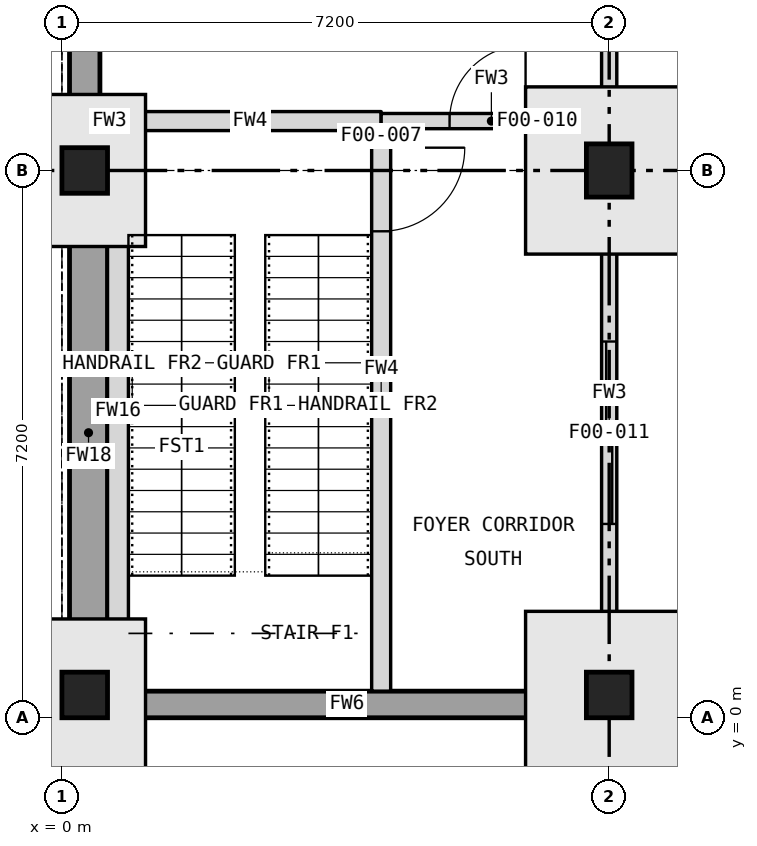
"""IFC4 building model, lengths in metres.
Left out: names, types, materials, properties, quantities, classifications, styles, units other than length and angle.
Written with IfcOpenShell. Run it as: python <this file> out.ifc"""

import sys

from ifc_helpers import new_model, si_unit, direction, frame, frame_2d, origin, origin_2d, place, context, subcontext, project, spatial, rectangle, extrude, element, fill, save


model = new_model("IFC4")
c1 = context("Model", 3, precision=1e-05, world=origin(), true_north=direction((0.0, 1.0)))
c2 = subcontext(c1, "Body", "Model", "MODEL_VIEW")
j1 = project(units=[si_unit("LENGTHUNIT", "METRE"), si_unit("PLANEANGLEUNIT", "RADIAN")], contexts=[c1])
p1 = place(None, origin())
s1 = spatial("IfcSite", under=j1, at=p1, CompositionType="ELEMENT")
p2 = place(p1, origin())
s2 = spatial("IfcBuilding", under=s1, at=p2, CompositionType="ELEMENT")
p3 = place(p2, origin())
s3 = spatial("IfcBuildingStorey", under=s2, at=p3, CompositionType="ELEMENT", Elevation=0.0)
for number, where, z_axis, x_axis in (
    (1, (0.3, 0.3, -0.45), (0.0, 0.0, 1.0), (1.0, 0.0, 0.0)),
    (2, (0.3, 7.2, -0.45), (0.0, 0.0, 1.0), (1.0, 0.0, 0.0)),
    (3, (7.2, 0.3, -0.45), (0.0, 0.0, 1.0), (1.0, 0.0, 0.0)),
):
    element("IfcColumn", number, at=place(p3, frame(where, z_axis=z_axis, x_axis=x_axis)), inside=s3, PredefinedType="COLUMN", context=c2, shape_type="SweptSolid", body=[
        extrude(rectangle(XDim=0.6, YDim=0.6, at=origin_2d()), origin(), (0.0, 0.0, 1.0), 6.45),
    ])
p4 = place(p3, frame((7.2, 7.2, -0.405), z_axis=(0.0, 0.0, 1.0), x_axis=(1.0, 0.0, 0.0)))
e4 = element("IfcColumn", 4, at=p4, inside=s3, PredefinedType="COLUMN", context=c2, shape_type="SweptSolid", body=[
    extrude(rectangle(XDim=0.6, YDim=0.7, at=origin_2d()), origin(), (0.0, 0.0, 1.0), 6.405),
])
p5 = place(p3, frame((0.6, 0.175, 0.0), z_axis=(0.0, 0.0, 1.0), x_axis=(1.0, 0.0, 0.0)))
e5 = element("IfcWall", 5, at=p5, inside=s3, PredefinedType="SOLIDWALL", context=c2, shape_type="SweptSolid", body=[
    extrude(rectangle(XDim=6.3, YDim=0.35, at=frame_2d((3.15, 0.0))), origin(), (0.0, 0.0, 1.0), 5.675),
])
p6 = place(p3, frame((7.5, 0.175, 0.0), z_axis=(0.0, 0.0, 1.0), x_axis=(1.0, 0.0, 0.0)))
e6 = element("IfcWall", 6, at=p6, inside=s3, PredefinedType="SOLIDWALL", context=c2, shape_type="SweptSolid", body=[
    extrude(rectangle(XDim=6.4, YDim=0.35, at=frame_2d((3.2, 0.0))), origin(), (0.0, 0.0, 1.0), 5.675),
])
p7 = place(p6, frame((2.2, 0.0, 0.9)))
e7 = element("IfcOpeningElement", 7, at=p7, cuts=e6, PredefinedType="OPENING", context=c2, shape_type="SweptSolid", body=[
    extrude(rectangle(XDim=2.0, YDim=2.4, at=frame_2d((1.0, 1.2))), frame((0.0, 0.185, 0.0), z_axis=(0.0, -1.0, 0.0), x_axis=(1.0, 0.0, 0.0)), (0.0, 0.0, 1.0), 0.37),
])
p8 = place(p3, frame((0.35, 0.6, 0.0), z_axis=(0.0, 0.0, 1.0), x_axis=(0.0, 1.0, 0.0)))
e8 = element("IfcWall", 8, at=p8, inside=s3, PredefinedType="SOLIDWALL", context=c2, shape_type="SweptSolid", body=[
    extrude(rectangle(XDim=6.3, YDim=0.5, at=frame_2d((3.15, 0.0))), origin(), (0.0, 0.0, 1.0), 5.675),
])
p9 = place(p3, frame((0.3, 7.5, 0.0), z_axis=(0.0, 0.0, 1.0), x_axis=(0.0, 1.0, 0.0)))
e9 = element("IfcWall", 9, at=p9, inside=s3, PredefinedType="SOLIDWALL", context=c2, shape_type="SweptSolid", body=[
    extrude(rectangle(XDim=6.6, YDim=0.4, at=frame_2d((3.3, 0.0))), origin(), (0.0, 0.0, 1.0), 5.675),
])
p10 = place(p9, frame((2.4, 0.0, 1.2)))
e10 = element("IfcOpeningElement", 10, at=p10, cuts=e9, PredefinedType="OPENING", context=c2, shape_type="SweptSolid", body=[
    extrude(rectangle(XDim=1.8, YDim=1.8, at=frame_2d((0.9, 0.9))), frame((0.0, 0.21, 0.0), z_axis=(0.0, -1.0, 0.0), x_axis=(1.0, 0.0, 0.0)), (0.0, 0.0, 1.0), 0.42),
])
p11 = place(p3, frame((0.738, 0.35, 0.0), z_axis=(0.0, 0.0, 1.0), x_axis=(0.0, 1.0, 0.0)))
e11 = element("IfcWall", 11, at=p11, inside=s3, PredefinedType="SOLIDWALL", context=c2, shape_type="SweptSolid", body=[
    extrude(rectangle(XDim=7.375, YDim=0.275, at=frame_2d((3.688, 0.0))), origin(), (0.0, 0.0, 1.0), 5.675),
])
p12 = place(p3, frame((4.2, 0.35, 0.0), z_axis=(0.0, 0.0, 1.0), x_axis=(0.0, 1.0, 0.0)))
e12 = element("IfcWall", 12, at=p12, inside=s3, PredefinedType="SOLIDWALL", context=c2, shape_type="SweptSolid", body=[
    extrude(rectangle(XDim=7.375, YDim=0.25, at=frame_2d((3.688, 0.0))), origin(), (0.0, 0.0, 1.0), 5.675),
])
p13 = place(p12, frame((6.05, 0.0, 0.0)))
e13 = element("IfcOpeningElement", 13, at=p13, cuts=e12, PredefinedType="OPENING", context=c2, shape_type="SweptSolid", body=[
    extrude(rectangle(XDim=1.1, YDim=2.1, at=frame_2d((0.55, 1.05))), frame((0.0, 0.135, 0.0), z_axis=(0.0, -1.0, 0.0), x_axis=(1.0, 0.0, 0.0)), (0.0, 0.0, 1.0), 0.27),
])
p14 = place(p3, frame((7.2, 0.6, 0.0), z_axis=(0.0, 0.0, 1.0), x_axis=(0.0, 1.0, 0.0)))
e14 = element("IfcWall", 14, at=p14, inside=s3, PredefinedType="PARTITIONING", context=c2, shape_type="SweptSolid", body=[
    extrude(rectangle(XDim=6.25, YDim=0.2, at=frame_2d((3.125, 0.0))), origin(), (0.0, 0.0, 1.0), 5.675),
])
p15 = place(p14, frame((1.95, 0.0, 0.0)))
e15 = element("IfcOpeningElement", 15, at=p15, cuts=e14, PredefinedType="OPENING", context=c2, shape_type="SweptSolid", body=[
    extrude(rectangle(XDim=2.4, YDim=2.1, at=frame_2d((1.2, 1.05))), frame((0.0, 0.11, 0.0), z_axis=(0.0, -1.0, 0.0), x_axis=(1.0, 0.0, 0.0)), (0.0, 0.0, 1.0), 0.22),
])
p16 = place(p3, frame((7.2, 7.55, 0.0), z_axis=(0.0, 0.0, 1.0), x_axis=(0.0, 1.0, 0.0)))
e16 = element("IfcWall", 16, at=p16, inside=s3, PredefinedType="PARTITIONING", context=c2, shape_type="SweptSolid", body=[
    extrude(rectangle(XDim=6.5, YDim=0.2, at=frame_2d((3.25, 0.0))), origin(), (0.0, 0.0, 1.0), 5.675),
])
p17 = place(p3, frame((0.75, 7.85, 0.0), z_axis=(0.0, 0.0, 1.0), x_axis=(1.0, 0.0, 0.0)))
e17 = element("IfcWall", 17, at=p17, inside=s3, PredefinedType="SOLIDWALL", context=c2, shape_type="SweptSolid", body=[
    extrude(rectangle(XDim=3.45, YDim=0.25, at=frame_2d((1.725, 0.0))), origin(), (0.0, 0.0, 1.0), 5.675),
])
p18 = place(p3, frame((0.5, 7.85, 0.0), z_axis=(0.0, 0.0, 1.0), x_axis=(1.0, 0.0, 0.0)))
e18 = element("IfcWall", 18, at=p18, inside=s3, PredefinedType="PARTITIONING", context=c2, shape_type="SweptSolid", body=[
    extrude(rectangle(XDim=0.25, YDim=0.2, at=frame_2d((0.125, 0.0))), origin(), (0.0, 0.0, 1.0), 5.675),
])
p19 = place(p3, frame((4.2, 7.85, 0.0), z_axis=(0.0, 0.0, 1.0), x_axis=(1.0, 0.0, 0.0)))
e19 = element("IfcWall", 19, at=p19, inside=s3, PredefinedType="PARTITIONING", context=c2, shape_type="SweptSolid", body=[
    extrude(rectangle(XDim=2.9, YDim=0.2, at=frame_2d((1.45, 0.0))), origin(), (0.0, 0.0, 1.0), 5.675),
])
p20 = place(p19, frame((0.9, 0.0, 0.0)))
e20 = element("IfcOpeningElement", 20, at=p20, cuts=e19, PredefinedType="OPENING", context=c2, shape_type="SweptSolid", body=[
    extrude(rectangle(XDim=1.0, YDim=2.1, at=frame_2d((0.5, 1.05))), frame((0.0, 0.11, 0.0), z_axis=(0.0, -1.0, 0.0), x_axis=(1.0, 0.0, 0.0)), (0.0, 0.0, 1.0), 0.22),
])
p21 = place(p13, frame((1.1, 0.0, 0.0), z_axis=(0.0, 0.0, 1.0), x_axis=(-1.0, 0.0, 0.0)))
e21 = element("IfcDoor", 21, at=p21, inside=s3, OperationType="SINGLE_SWING_LEFT", PredefinedType="DOOR", context=c2, shape_type="SweptSolid", body=[
    extrude(rectangle(XDim=1.1, YDim=2.1, at=frame_2d((0.55, 1.05))), frame((0.0, 0.025, 0.0), z_axis=(0.0, -1.0, 0.0), x_axis=(1.0, 0.0, 0.0)), (0.0, 0.0, 1.0), 0.05),
])
fill(e13, e21)
p22 = place(p20, origin())
e22 = element("IfcDoor", 22, at=p22, inside=s3, OperationType="SINGLE_SWING_RIGHT", PredefinedType="DOOR", context=c2, shape_type="SweptSolid", body=[
    extrude(rectangle(XDim=1.0, YDim=2.1, at=frame_2d((0.5, 1.05))), frame((0.0, 0.025, 0.0), z_axis=(0.0, -1.0, 0.0), x_axis=(1.0, 0.0, 0.0)), (0.0, 0.0, 1.0), 0.05),
])
fill(e20, e22)
p23 = place(p15, origin())
e23 = element("IfcDoor", 23, at=p23, inside=s3, OperationType="DOUBLE_DOOR_SLIDING", PredefinedType="DOOR", context=c2, shape_type="SweptSolid", body=[
    extrude(rectangle(XDim=2.4, YDim=2.1, at=frame_2d((1.2, 1.05))), frame((0.0, 0.025, 0.0), z_axis=(0.0, -1.0, 0.0), x_axis=(1.0, 0.0, 0.0)), (0.0, 0.0, 1.0), 0.05),
])
fill(e15, e23)
save(model, sys.argv[1])
